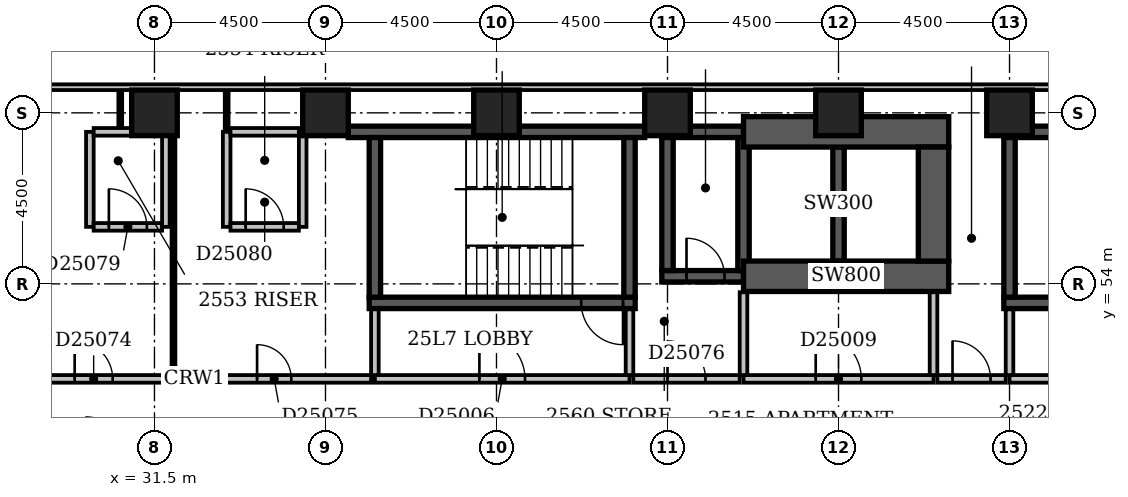
"""IFC4 building model, lengths in metres.
Left out: names, types, materials, properties, quantities, classifications, styles, units other than length and angle.
Written with IfcOpenShell. Run it as: python <this file> out.ifc"""

import sys

from ifc_helpers import new_model, si_unit, direction, frame, frame_2d, origin, origin_2d, place, context, subcontext, project, spatial, rectangle, extrude, element, fill, save


model = new_model("IFC4")
c1 = context("Model", 3, precision=1e-05, world=origin(), true_north=direction((0.0, 1.0)))
c2 = subcontext(c1, "Body", "Model", "MODEL_VIEW")
j1 = project(units=[si_unit("LENGTHUNIT", "METRE"), si_unit("PLANEANGLEUNIT", "RADIAN")], contexts=[c1])
p1 = place(None, origin())
s1 = spatial("IfcSite", under=j1, at=p1, CompositionType="ELEMENT")
p2 = place(p1, origin())
s2 = spatial("IfcBuilding", under=s1, at=p2, CompositionType="ELEMENT")
p3 = place(p2, frame((0.0, 0.0, 101.0)))
s3 = spatial("IfcBuildingStorey", under=s2, at=p3, CompositionType="ELEMENT", Elevation=101.0)
p4 = place(p3, frame((36.6, 58.0, -0.3), z_axis=(0.0, 0.0, 1.0), x_axis=(1.0, 0.0, 0.0)))
e1 = element("IfcWall", 1, at=p4, inside=s3, PredefinedType="SHEAR", context=c2, shape_type="SweptSolid", body=[
    extrude(rectangle(XDim=7.8, YDim=0.3, at=frame_2d((3.9, 0.0))), origin(), (0.0, 0.0, 1.0), 3.6),
])
p5 = place(p3, frame((37.15, 53.5, -0.3), z_axis=(0.0, 0.0, 1.0), x_axis=(1.0, 0.0, 0.0)))
e2 = element("IfcWall", 2, at=p5, inside=s3, PredefinedType="SHEAR", context=c2, shape_type="SweptSolid", body=[
    extrude(rectangle(XDim=7.0, YDim=0.3, at=frame_2d((3.5, 0.0))), origin(), (0.0, 0.0, 1.0), 3.6),
])
p6 = place(p5, frame((5.58, 0.0, 0.3)))
e3 = element("IfcOpeningElement", 3, at=p6, cuts=e2, PredefinedType="OPENING", context=c2, shape_type="SweptSolid", body=[
    extrude(rectangle(XDim=1.1, YDim=2.1, at=frame_2d((0.55, 1.05))), frame((0.0, 0.162, 0.0), z_axis=(0.0, -1.0, 0.0), x_axis=(1.0, 0.0, 0.0)), (0.0, 0.0, 1.0), 0.324),
])
for number, where, z_axis, x_axis in (
    (4, (37.3, 53.65, -0.3), (0.0, 0.0, 1.0), (0.0, 1.0, 0.0)),
    (5, (44.0, 53.65, -0.3), (0.0, 0.0, 1.0), (0.0, 1.0, 0.0)),
):
    element("IfcWall", number, at=place(p3, frame(where, z_axis=z_axis, x_axis=x_axis)), inside=s3, PredefinedType="SHEAR", context=c2, shape_type="SweptSolid", body=[
        extrude(rectangle(XDim=4.2, YDim=0.3, at=frame_2d((2.1, 0.0))), origin(), (0.0, 0.0, 1.0), 3.6),
    ])
p7 = place(p3, frame((44.85, 54.2, -0.3), z_axis=(0.0, 0.0, 1.0), x_axis=(1.0, 0.0, 0.0)))
e6 = element("IfcWall", 6, at=p7, inside=s3, PredefinedType="SHEAR", context=c2, shape_type="SweptSolid", body=[
    extrude(rectangle(XDim=2.15, YDim=0.3, at=frame_2d((1.075, 0.0))), origin(), (0.0, 0.0, 1.0), 3.6),
])
p8 = place(p7, frame((0.65, 0.0, 0.3)))
e7 = element("IfcOpeningElement", 7, at=p8, cuts=e6, PredefinedType="OPENING", context=c2, shape_type="SweptSolid", body=[
    extrude(rectangle(XDim=1.0, YDim=2.1, at=frame_2d((0.5, 1.05))), frame((0.0, 0.162, 0.0), z_axis=(0.0, -1.0, 0.0), x_axis=(1.0, 0.0, 0.0)), (0.0, 0.0, 1.0), 0.324),
])
p9 = place(p3, frame((44.85, 58.0, -0.3), z_axis=(0.0, 0.0, 1.0), x_axis=(1.0, 0.0, 0.0)))
e8 = element("IfcWall", 8, at=p9, inside=s3, PredefinedType="SHEAR", context=c2, shape_type="SweptSolid", body=[
    extrude(rectangle(XDim=2.15, YDim=0.3, at=frame_2d((1.075, 0.0))), origin(), (0.0, 0.0, 1.0), 3.6),
])
p10 = place(p3, frame((45.0, 54.35, -0.3), z_axis=(0.0, 0.0, 1.0), x_axis=(0.0, 1.0, 0.0)))
e9 = element("IfcWall", 9, at=p10, inside=s3, PredefinedType="SHEAR", context=c2, shape_type="SweptSolid", body=[
    extrude(rectangle(XDim=3.5, YDim=0.3, at=frame_2d((1.75, 0.0))), origin(), (0.0, 0.0, 1.0), 3.6),
])
p11 = place(p3, frame((47.0, 54.2, -0.3), z_axis=(0.0, 0.0, 1.0), x_axis=(1.0, 0.0, 0.0)))
e10 = element("IfcWall", 10, at=p11, inside=s3, PredefinedType="SHEAR", context=c2, shape_type="SweptSolid", body=[
    extrude(rectangle(XDim=5.4, YDim=0.8, at=frame_2d((2.7, 0.0))), origin(), (0.0, 0.0, 1.0), 3.6),
])
p12 = place(p3, frame((47.0, 54.35, -0.3), z_axis=(0.0, 0.0, 1.0), x_axis=(0.0, 1.0, 0.0)))
e11 = element("IfcWall", 11, at=p12, inside=s3, PredefinedType="SHEAR", context=c2, shape_type="SweptSolid", body=[
    extrude(rectangle(XDim=3.5, YDim=0.3, at=frame_2d((1.75, 0.0))), origin(), (0.0, 0.0, 1.0), 3.6),
])
p13 = place(p3, frame((47.0, 58.0, -0.3), z_axis=(0.0, 0.0, 1.0), x_axis=(1.0, 0.0, 0.0)))
e12 = element("IfcWall", 12, at=p13, inside=s3, PredefinedType="SHEAR", context=c2, shape_type="SweptSolid", body=[
    extrude(rectangle(XDim=5.4, YDim=0.8, at=frame_2d((2.7, 0.0))), origin(), (0.0, 0.0, 1.0), 3.6),
])
p14 = place(p3, frame((49.5, 54.6, -0.3), z_axis=(0.0, 0.0, 1.0), x_axis=(0.0, 1.0, 0.0)))
e13 = element("IfcWall", 13, at=p14, inside=s3, PredefinedType="SHEAR", context=c2, shape_type="SweptSolid", body=[
    extrude(rectangle(XDim=3.0, YDim=0.3, at=frame_2d((1.5, 0.0))), origin(), (0.0, 0.0, 1.0), 3.6),
])
p15 = place(p3, frame((52.0, 54.6, -0.3), z_axis=(0.0, 0.0, 1.0), x_axis=(0.0, 1.0, 0.0)))
e14 = element("IfcWall", 14, at=p15, inside=s3, PredefinedType="SHEAR", context=c2, shape_type="SweptSolid", body=[
    extrude(rectangle(XDim=3.0, YDim=0.8, at=frame_2d((1.5, 0.0))), origin(), (0.0, 0.0, 1.0), 3.6),
])
p16 = place(p3, frame((53.85, 53.5, -0.3), z_axis=(0.0, 0.0, 1.0), x_axis=(1.0, 0.0, 0.0)))
e15 = element("IfcWall", 15, at=p16, inside=s3, PredefinedType="SHEAR", context=c2, shape_type="SweptSolid", body=[
    extrude(rectangle(XDim=7.0, YDim=0.3, at=frame_2d((3.5, 0.0))), origin(), (0.0, 0.0, 1.0), 3.6),
])
p17 = place(p16, frame((5.58, 0.0, 0.3)))
e16 = element("IfcOpeningElement", 16, at=p17, cuts=e15, PredefinedType="OPENING", context=c2, shape_type="SweptSolid", body=[
    extrude(rectangle(XDim=1.1, YDim=2.1, at=frame_2d((0.55, 1.05))), frame((0.0, 0.162, 0.0), z_axis=(0.0, -1.0, 0.0), x_axis=(1.0, 0.0, 0.0)), (0.0, 0.0, 1.0), 0.324),
])
p18 = place(p3, frame((53.85, 58.0, -0.3), z_axis=(0.0, 0.0, 1.0), x_axis=(1.0, 0.0, 0.0)))
e17 = element("IfcWall", 17, at=p18, inside=s3, PredefinedType="SHEAR", context=c2, shape_type="SweptSolid", body=[
    extrude(rectangle(XDim=7.0, YDim=0.3, at=frame_2d((3.5, 0.0))), origin(), (0.0, 0.0, 1.0), 3.6),
])
p19 = place(p3, frame((54.0, 53.65, -0.3), z_axis=(0.0, 0.0, 1.0), x_axis=(0.0, 1.0, 0.0)))
e18 = element("IfcWall", 18, at=p19, inside=s3, PredefinedType="SHEAR", context=c2, shape_type="SweptSolid", body=[
    extrude(rectangle(XDim=4.2, YDim=0.3, at=frame_2d((2.1, 0.0))), origin(), (0.0, 0.0, 1.0), 3.6),
])
for number, where, z_axis, x_axis in (
    (19, (31.5, 58.5, -0.3), (0.0, 0.0, 1.0), (1.0, 0.0, 0.0)),
    (20, (36.0, 58.5, -0.3), (0.0, 0.0, 1.0), (1.0, 0.0, 0.0)),
    (21, (40.5, 58.5, -0.3), (0.0, 0.0, 1.0), (1.0, 0.0, 0.0)),
    (22, (45.0, 58.5, -0.3), (0.0, 0.0, 1.0), (1.0, 0.0, 0.0)),
    (23, (49.5, 58.5, -0.3), (0.0, 0.0, 1.0), (1.0, 0.0, 0.0)),
    (24, (54.0, 58.5, -0.3), (0.0, 0.0, 1.0), (1.0, 0.0, 0.0)),
):
    element("IfcColumn", number, at=place(p3, frame(where, z_axis=z_axis, x_axis=x_axis)), inside=s3, PredefinedType="COLUMN", context=c2, shape_type="SweptSolid", body=[
        extrude(rectangle(XDim=1.2, YDim=1.2, at=origin_2d()), origin(), (0.0, 0.0, 1.0), 3.6),
    ])
p20 = place(p3, frame((68.1, 59.175, 0.0), z_axis=(0.0, 0.0, 1.0), x_axis=(-1.0, 0.0, 0.0)))
e25 = element("IfcWall", 25, at=p20, inside=s3, PredefinedType="STANDARD", context=c2, shape_type="SweptSolid", body=[
    extrude(rectangle(XDim=68.85, YDim=0.15, at=frame_2d((34.425, 0.0))), origin(), (0.0, 0.0, 1.0), 2.7),
])
p21 = place(p20, frame((1.65, 0.0, 0.6)))
e26 = element("IfcOpeningElement", 26, at=p21, cuts=e25, PredefinedType="OPENING", context=c2, shape_type="SweptSolid", body=[
    extrude(rectangle(XDim=2.4, YDim=1.8, at=frame_2d((1.2, 0.9))), frame((0.0, 0.087, 0.0), z_axis=(0.0, -1.0, 0.0), x_axis=(1.0, 0.0, 0.0)), (0.0, 0.0, 1.0), 0.174),
])
p22 = place(p20, frame((6.324, 0.0, 0.6)))
e27 = element("IfcOpeningElement", 27, at=p22, cuts=e25, PredefinedType="OPENING", context=c2, shape_type="SweptSolid", body=[
    extrude(rectangle(XDim=2.4, YDim=1.8, at=frame_2d((1.2, 0.9))), frame((0.0, 0.087, 0.0), z_axis=(0.0, -1.0, 0.0), x_axis=(1.0, 0.0, 0.0)), (0.0, 0.0, 1.0), 0.174),
])
p23 = place(p3, frame((47.0, 51.5, 0.0), z_axis=(0.0, 0.0, 1.0), x_axis=(1.0, 0.0, 0.0)))
e28 = element("IfcWall", 28, at=p23, inside=s3, PredefinedType="PARTITIONING", context=c2, shape_type="SweptSolid", body=[
    extrude(rectangle(XDim=5.0, YDim=0.2, at=frame_2d((2.5, 0.0))), origin(), (0.0, 0.0, 1.0), 3.3),
])
p24 = place(p23, frame((1.9, 0.0, 0.0)))
e29 = element("IfcOpeningElement", 29, at=p24, cuts=e28, PredefinedType="OPENING", context=c2, shape_type="SweptSolid", body=[
    extrude(rectangle(XDim=1.2, YDim=2.1, at=frame_2d((0.6, 1.05))), frame((0.0, 0.112, 0.0), z_axis=(0.0, -1.0, 0.0), x_axis=(1.0, 0.0, 0.0)), (0.0, 0.0, 1.0), 0.224),
])
for number, where, z_axis, x_axis in (
    (30, (52.0, 51.6, 0.0), (0.0, 0.0, 1.0), (0.0, 1.0, 0.0)),
    (31, (47.0, 51.6, 0.0), (0.0, 0.0, 1.0), (0.0, 1.0, 0.0)),
):
    element("IfcWall", number, at=place(p3, frame(where, z_axis=z_axis, x_axis=x_axis)), inside=s3, PredefinedType="PARTITIONING", context=c2, shape_type="SweptSolid", body=[
        extrude(rectangle(XDim=2.18, YDim=0.2, at=frame_2d((1.09, 0.0))), origin(), (0.0, 0.0, 1.0), 3.3),
    ])
p25 = place(p3, frame((37.3, 51.5, 0.0), z_axis=(0.0, 0.0, 1.0), x_axis=(1.0, 0.0, 0.0)))
e32 = element("IfcWall", 32, at=p25, inside=s3, PredefinedType="PARTITIONING", context=c2, shape_type="SweptSolid", body=[
    extrude(rectangle(XDim=6.7, YDim=0.2, at=frame_2d((3.35, 0.0))), origin(), (0.0, 0.0, 1.0), 3.3),
])
p26 = place(p25, frame((2.75, 0.0, 0.0)))
e33 = element("IfcOpeningElement", 33, at=p26, cuts=e32, PredefinedType="OPENING", context=c2, shape_type="SweptSolid", body=[
    extrude(rectangle(XDim=1.2, YDim=2.1, at=frame_2d((0.6, 1.05))), frame((0.0, 0.112, 0.0), z_axis=(0.0, -1.0, 0.0), x_axis=(1.0, 0.0, 0.0)), (0.0, 0.0, 1.0), 0.224),
])
for number, where, z_axis, x_axis in (
    (34, (44.0, 51.6, 0.0), (0.0, 0.0, 1.0), (0.0, 1.0, 0.0)),
    (35, (37.3, 51.6, 0.0), (0.0, 0.0, 1.0), (0.0, 1.0, 0.0)),
):
    element("IfcWall", number, at=place(p3, frame(where, z_axis=z_axis, x_axis=x_axis)), inside=s3, PredefinedType="PARTITIONING", context=c2, shape_type="SweptSolid", body=[
        extrude(rectangle(XDim=1.73, YDim=0.2, at=frame_2d((0.865, 0.0))), origin(), (0.0, 0.0, 1.0), 3.3),
    ])
p27 = place(p3, frame((54.0, 51.5, 0.0), z_axis=(0.0, 0.0, 1.0), x_axis=(1.0, 0.0, 0.0)))
e36 = element("IfcWall", 36, at=p27, inside=s3, PredefinedType="PARTITIONING", context=c2, shape_type="SweptSolid", body=[
    extrude(rectangle(XDim=6.7, YDim=0.2, at=frame_2d((3.35, 0.0))), origin(), (0.0, 0.0, 1.0), 3.3),
])
p28 = place(p27, frame((2.75, 0.0, 0.0)))
e37 = element("IfcOpeningElement", 37, at=p28, cuts=e36, PredefinedType="OPENING", context=c2, shape_type="SweptSolid", body=[
    extrude(rectangle(XDim=1.2, YDim=2.1, at=frame_2d((0.6, 1.05))), frame((0.0, 0.112, 0.0), z_axis=(0.0, -1.0, 0.0), x_axis=(1.0, 0.0, 0.0)), (0.0, 0.0, 1.0), 0.224),
])
p29 = place(p3, frame((54.0, 51.6, 0.0), z_axis=(0.0, 0.0, 1.0), x_axis=(0.0, 1.0, 0.0)))
e38 = element("IfcWall", 38, at=p29, inside=s3, PredefinedType="PARTITIONING", context=c2, shape_type="SweptSolid", body=[
    extrude(rectangle(XDim=1.73, YDim=0.2, at=frame_2d((0.865, 0.0))), origin(), (0.0, 0.0, 1.0), 2.6),
])
p30 = place(p3, frame((27.9, 51.5, 0.0), z_axis=(0.0, 0.0, 1.0), x_axis=(1.0, 0.0, 0.0)))
e39 = element("IfcWall", 39, at=p30, inside=s3, PredefinedType="PARTITIONING", context=c2, shape_type="SweptSolid", body=[
    extrude(rectangle(XDim=9.3, YDim=0.2, at=frame_2d((4.65, 0.0))), origin(), (0.0, 0.0, 1.0), 3.3),
])
p31 = place(p30, frame((1.5, 0.0, 0.0)))
e40 = element("IfcOpeningElement", 40, at=p31, cuts=e39, PredefinedType="OPENING", context=c2, shape_type="SweptSolid", body=[
    extrude(rectangle(XDim=1.0, YDim=2.1, at=frame_2d((0.5, 1.05))), frame((0.0, 0.112, 0.0), z_axis=(0.0, -1.0, 0.0), x_axis=(1.0, 0.0, 0.0)), (0.0, 0.0, 1.0), 0.224),
])
p32 = place(p30, frame((6.3, 0.0, 0.0)))
e41 = element("IfcOpeningElement", 41, at=p32, cuts=e39, PredefinedType="OPENING", context=c2, shape_type="SweptSolid", body=[
    extrude(rectangle(XDim=0.9, YDim=2.1, at=frame_2d((0.45, 1.05))), frame((0.0, 0.112, 0.0), z_axis=(0.0, -1.0, 0.0), x_axis=(1.0, 0.0, 0.0)), (0.0, 0.0, 1.0), 0.224),
])
p33 = place(p3, frame((44.1, 51.5, 0.0), z_axis=(0.0, 0.0, 1.0), x_axis=(1.0, 0.0, 0.0)))
e42 = element("IfcWall", 42, at=p33, inside=s3, PredefinedType="PARTITIONING", context=c2, shape_type="SweptSolid", body=[
    extrude(rectangle(XDim=2.8, YDim=0.2, at=frame_2d((1.4, 0.0))), origin(), (0.0, 0.0, 1.0), 3.3),
])
p34 = place(p33, frame((0.9, 0.0, 0.0)))
e43 = element("IfcOpeningElement", 43, at=p34, cuts=e42, PredefinedType="OPENING", context=c2, shape_type="SweptSolid", body=[
    extrude(rectangle(XDim=1.0, YDim=2.1, at=frame_2d((0.5, 1.05))), frame((0.0, 0.112, 0.0), z_axis=(0.0, -1.0, 0.0), x_axis=(1.0, 0.0, 0.0)), (0.0, 0.0, 1.0), 0.224),
])
p35 = place(p3, frame((52.1, 51.5, 0.0), z_axis=(0.0, 0.0, 1.0), x_axis=(1.0, 0.0, 0.0)))
e44 = element("IfcWall", 44, at=p35, inside=s3, PredefinedType="PARTITIONING", context=c2, shape_type="SweptSolid", body=[
    extrude(rectangle(XDim=1.8, YDim=0.2, at=frame_2d((0.9, 0.0))), origin(), (0.0, 0.0, 1.0), 3.3),
])
p36 = place(p35, frame((0.4, 0.0, 0.0)))
e45 = element("IfcOpeningElement", 45, at=p36, cuts=e44, PredefinedType="OPENING", context=c2, shape_type="SweptSolid", body=[
    extrude(rectangle(XDim=1.0, YDim=2.1, at=frame_2d((0.5, 1.05))), frame((0.0, 0.112, 0.0), z_axis=(0.0, -1.0, 0.0), x_axis=(1.0, 0.0, 0.0)), (0.0, 0.0, 1.0), 0.224),
])
p37 = place(p3, frame((32.0, 51.6, 0.0), z_axis=(0.0, 0.0, 1.0), x_axis=(0.0, 1.0, 0.0)))
e46 = element("IfcWall", 46, at=p37, inside=s3, PredefinedType="PARTITIONING", context=c2, shape_type="SweptSolid", body=[
    extrude(rectangle(XDim=6.3, YDim=0.1, at=frame_2d((3.15, 0.0))), origin(), (0.0, 0.0, 1.0), 3.3),
])
p38 = place(p3, frame((29.8, 55.5, 0.0), z_axis=(0.0, 0.0, 1.0), x_axis=(0.0, 1.0, 0.0)))
e47 = element("IfcWall", 47, at=p38, inside=s3, PredefinedType="PARTITIONING", context=c2, shape_type="SweptSolid", body=[
    extrude(rectangle(XDim=2.5, YDim=0.2, at=frame_2d((1.25, 0.0))), origin(), (0.0, 0.0, 1.0), 3.3),
])
p39 = place(p3, frame((29.9, 55.5, 0.0), z_axis=(0.0, 0.0, 1.0), x_axis=(1.0, 0.0, 0.0)))
e48 = element("IfcWall", 48, at=p39, inside=s3, PredefinedType="PARTITIONING", context=c2, shape_type="SweptSolid", body=[
    extrude(rectangle(XDim=1.8, YDim=0.2, at=frame_2d((0.9, 0.0))), origin(), (0.0, 0.0, 1.0), 3.3),
])
p40 = place(p39, frame((0.4, 0.0, 0.0)))
e49 = element("IfcOpeningElement", 49, at=p40, cuts=e48, PredefinedType="OPENING", context=c2, shape_type="SweptSolid", body=[
    extrude(rectangle(XDim=1.0, YDim=2.1, at=frame_2d((0.5, 1.05))), frame((0.0, 0.112, 0.0), z_axis=(0.0, -1.0, 0.0), x_axis=(1.0, 0.0, 0.0)), (0.0, 0.0, 1.0), 0.224),
])
for number, where, z_axis, x_axis in (
    (50, (31.8, 55.5, 0.0), (0.0, 0.0, 1.0), (0.0, 1.0, 0.0)),
    (51, (33.4, 55.5, 0.0), (0.0, 0.0, 1.0), (0.0, 1.0, 0.0)),
):
    element("IfcWall", number, at=place(p3, frame(where, z_axis=z_axis, x_axis=x_axis)), inside=s3, PredefinedType="PARTITIONING", context=c2, shape_type="SweptSolid", body=[
        extrude(rectangle(XDim=2.5, YDim=0.2, at=frame_2d((1.25, 0.0))), origin(), (0.0, 0.0, 1.0), 3.3),
    ])
p41 = place(p3, frame((33.5, 55.5, 0.0), z_axis=(0.0, 0.0, 1.0), x_axis=(1.0, 0.0, 0.0)))
e52 = element("IfcWall", 52, at=p41, inside=s3, PredefinedType="PARTITIONING", context=c2, shape_type="SweptSolid", body=[
    extrude(rectangle(XDim=1.8, YDim=0.2, at=frame_2d((0.9, 0.0))), origin(), (0.0, 0.0, 1.0), 3.3),
])
p42 = place(p41, frame((0.4, 0.0, 0.0)))
e53 = element("IfcOpeningElement", 53, at=p42, cuts=e52, PredefinedType="OPENING", context=c2, shape_type="SweptSolid", body=[
    extrude(rectangle(XDim=1.0, YDim=2.1, at=frame_2d((0.5, 1.05))), frame((0.0, 0.112, 0.0), z_axis=(0.0, -1.0, 0.0), x_axis=(1.0, 0.0, 0.0)), (0.0, 0.0, 1.0), 0.224),
])
p43 = place(p3, frame((35.4, 55.5, 0.0), z_axis=(0.0, 0.0, 1.0), x_axis=(0.0, 1.0, 0.0)))
e54 = element("IfcWall", 54, at=p43, inside=s3, PredefinedType="PARTITIONING", context=c2, shape_type="SweptSolid", body=[
    extrude(rectangle(XDim=2.5, YDim=0.2, at=frame_2d((1.25, 0.0))), origin(), (0.0, 0.0, 1.0), 2.4),
])
p44 = place(p3, frame((29.9, 58.0, 0.0), z_axis=(0.0, 0.0, 1.0), x_axis=(1.0, 0.0, 0.0)))
e55 = element("IfcWall", 55, at=p44, inside=s3, PredefinedType="PARTITIONING", context=c2, shape_type="SweptSolid", body=[
    extrude(rectangle(XDim=1.8, YDim=0.2, at=frame_2d((0.9, 0.0))), origin(), (0.0, 0.0, 1.0), 3.3),
])
p45 = place(p3, frame((33.4, 58.0, 0.0), z_axis=(0.0, 0.0, 1.0), x_axis=(0.0, 1.0, 0.0)))
e56 = element("IfcWall", 56, at=p45, inside=s3, PredefinedType="PARTITIONING", context=c2, shape_type="SweptSolid", body=[
    extrude(rectangle(XDim=1.1, YDim=0.1, at=frame_2d((0.55, 0.0))), origin(), (0.0, 0.0, 1.0), 3.3),
])
p46 = place(p3, frame((33.5, 58.0, 0.0), z_axis=(0.0, 0.0, 1.0), x_axis=(1.0, 0.0, 0.0)))
e57 = element("IfcWall", 57, at=p46, inside=s3, PredefinedType="PARTITIONING", context=c2, shape_type="SweptSolid", body=[
    extrude(rectangle(XDim=1.8, YDim=0.2, at=frame_2d((0.9, 0.0))), origin(), (0.0, 0.0, 1.0), 3.3),
])
p47 = place(p3, frame((30.6, 58.1, 0.0), z_axis=(0.0, 0.0, 1.0), x_axis=(0.0, 1.0, 0.0)))
e58 = element("IfcWall", 58, at=p47, inside=s3, PredefinedType="PARTITIONING", context=c2, shape_type="SweptSolid", body=[
    extrude(rectangle(XDim=1.0, YDim=0.1, at=frame_2d((0.5, 0.0))), origin(), (0.0, 0.0, 1.0), 3.3),
])
p48 = place(p26, origin())
e59 = element("IfcDoor", 59, at=p48, inside=s3, OperationType="SINGLE_SWING_LEFT", PredefinedType="DOOR", context=c2, shape_type="SweptSolid", body=[
    extrude(rectangle(XDim=1.2, YDim=2.1, at=frame_2d((0.6, 1.05))), frame((0.0, 0.025, 0.0), z_axis=(0.0, -1.0, 0.0), x_axis=(1.0, 0.0, 0.0)), (0.0, 0.0, 1.0), 0.05),
])
fill(e33, e59)
p49 = place(p24, origin())
e60 = element("IfcDoor", 60, at=p49, inside=s3, OperationType="SINGLE_SWING_LEFT", PredefinedType="DOOR", context=c2, shape_type="SweptSolid", body=[
    extrude(rectangle(XDim=1.2, YDim=2.1, at=frame_2d((0.6, 1.05))), frame((0.0, 0.025, 0.0), z_axis=(0.0, -1.0, 0.0), x_axis=(1.0, 0.0, 0.0)), (0.0, 0.0, 1.0), 0.05),
])
fill(e29, e60)
p50 = place(p8, origin())
e61 = element("IfcDoor", 61, at=p50, inside=s3, OperationType="SINGLE_SWING_LEFT", PredefinedType="DOOR", context=c2, shape_type="SweptSolid", body=[
    extrude(rectangle(XDim=1.0, YDim=2.1, at=frame_2d((0.5, 1.05))), frame((0.0, 0.025, 0.0), z_axis=(0.0, -1.0, 0.0), x_axis=(1.0, 0.0, 0.0)), (0.0, 0.0, 1.0), 0.05),
])
fill(e7, e61)
p51 = place(p6, origin())
e62 = element("IfcDoor", 62, at=p51, inside=s3, OperationType="SINGLE_SWING_RIGHT", PredefinedType="DOOR", context=c2, shape_type="SweptSolid", body=[
    extrude(rectangle(XDim=1.1, YDim=2.1, at=frame_2d((0.55, 1.05))), frame((0.0, 0.025, 0.0), z_axis=(0.0, -1.0, 0.0), x_axis=(1.0, 0.0, 0.0)), (0.0, 0.0, 1.0), 0.05),
])
fill(e3, e62)
p52 = place(p31, origin())
e63 = element("IfcDoor", 63, at=p52, inside=s3, OperationType="SINGLE_SWING_LEFT", PredefinedType="DOOR", context=c2, shape_type="SweptSolid", body=[
    extrude(rectangle(XDim=1.0, YDim=2.1, at=frame_2d((0.5, 1.05))), frame((0.0, 0.025, 0.0), z_axis=(0.0, -1.0, 0.0), x_axis=(1.0, 0.0, 0.0)), (0.0, 0.0, 1.0), 0.05),
])
fill(e40, e63)
p53 = place(p32, origin())
e64 = element("IfcDoor", 64, at=p53, inside=s3, OperationType="SINGLE_SWING_LEFT", PredefinedType="DOOR", context=c2, shape_type="SweptSolid", body=[
    extrude(rectangle(XDim=0.9, YDim=2.1, at=frame_2d((0.45, 1.05))), frame((0.0, 0.025, 0.0), z_axis=(0.0, -1.0, 0.0), x_axis=(1.0, 0.0, 0.0)), (0.0, 0.0, 1.0), 0.05),
])
fill(e41, e64)
p54 = place(p34, origin())
e65 = element("IfcDoor", 65, at=p54, inside=s3, OperationType="SINGLE_SWING_LEFT", PredefinedType="DOOR", context=c2, shape_type="SweptSolid", body=[
    extrude(rectangle(XDim=1.0, YDim=2.1, at=frame_2d((0.5, 1.05))), frame((0.0, 0.025, 0.0), z_axis=(0.0, -1.0, 0.0), x_axis=(1.0, 0.0, 0.0)), (0.0, 0.0, 1.0), 0.05),
])
fill(e43, e65)
p55 = place(p36, origin())
e66 = element("IfcDoor", 66, at=p55, inside=s3, OperationType="SINGLE_SWING_LEFT", PredefinedType="DOOR", context=c2, shape_type="SweptSolid", body=[
    extrude(rectangle(XDim=1.0, YDim=2.1, at=frame_2d((0.5, 1.05))), frame((0.0, 0.025, 0.0), z_axis=(0.0, -1.0, 0.0), x_axis=(1.0, 0.0, 0.0)), (0.0, 0.0, 1.0), 0.05),
])
fill(e45, e66)
p56 = place(p40, origin())
e67 = element("IfcDoor", 67, at=p56, inside=s3, OperationType="SINGLE_SWING_LEFT", PredefinedType="DOOR", context=c2, shape_type="SweptSolid", body=[
    extrude(rectangle(XDim=1.0, YDim=2.1, at=frame_2d((0.5, 1.05))), frame((0.0, 0.025, 0.0), z_axis=(0.0, -1.0, 0.0), x_axis=(1.0, 0.0, 0.0)), (0.0, 0.0, 1.0), 0.05),
])
fill(e49, e67)
p57 = place(p42, origin())
e68 = element("IfcDoor", 68, at=p57, inside=s3, OperationType="SINGLE_SWING_LEFT", PredefinedType="DOOR", context=c2, shape_type="SweptSolid", body=[
    extrude(rectangle(XDim=1.0, YDim=2.1, at=frame_2d((0.5, 1.05))), frame((0.0, 0.025, 0.0), z_axis=(0.0, -1.0, 0.0), x_axis=(1.0, 0.0, 0.0)), (0.0, 0.0, 1.0), 0.05),
])
fill(e53, e68)
save(model, sys.argv[1])
